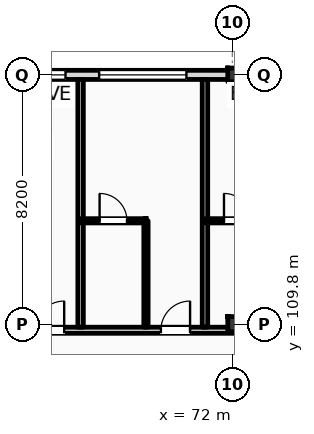
"""IFC4 building model, lengths in metres.
Left out: names, types, materials, properties, quantities, classifications, styles, units other than length and angle.
Written with IfcOpenShell. Run it as: python <this file> out.ifc"""

import sys

from ifc_helpers import new_model, si_unit, direction, frame, frame_2d, origin, origin_2d, place, context, subcontext, project, spatial, rectangle, i_section, extrude, element, fill, save


model = new_model("IFC4")
c1 = context("Model", 3, precision=1e-05, world=origin(), true_north=direction((0.0, 1.0)))
c2 = subcontext(c1, "Body", "Model", "MODEL_VIEW")
j1 = project(units=[si_unit("LENGTHUNIT", "METRE"), si_unit("PLANEANGLEUNIT", "RADIAN")], contexts=[c1])
p1 = place(None, origin())
s1 = spatial("IfcSite", under=j1, at=p1, CompositionType="ELEMENT")
p2 = place(p1, origin())
s2 = spatial("IfcBuilding", under=s1, at=p2, CompositionType="ELEMENT")
p3 = place(p2, frame((0.0, 0.0, 28.2)))
s3 = spatial("IfcBuildingStorey", under=s2, at=p3, CompositionType="ELEMENT", Elevation=28.2)
p4 = place(p3, frame((72.0, 109.8, 0.0), z_axis=(0.0, 0.0, 1.0), x_axis=(1.0, 0.0, 0.0)))
e1 = element("IfcColumn", 1, at=p4, inside=s3, PredefinedType="COLUMN", context=c2, shape_type="SweptSolid", body=[
    extrude(i_section(OverallWidth=0.3, OverallDepth=0.5, WebThickness=0.014, FlangeThickness=0.028, FilletRadius=0.027, at=origin_2d()), origin(), (0.0, 0.0, 1.0), 3.6),
])
p5 = place(p3, frame((72.0, 118.0, 0.0), z_axis=(0.0, 0.0, 1.0), x_axis=(1.0, 0.0, 0.0)))
e2 = element("IfcColumn", 2, at=p5, inside=s3, PredefinedType="COLUMN", context=c2, shape_type="SweptSolid", body=[
    extrude(i_section(OverallWidth=0.3, OverallDepth=0.45, WebThickness=0.014, FlangeThickness=0.026, FilletRadius=0.027, at=origin_2d()), origin(), (0.0, 0.0, 1.0), 3.6),
])
p6 = place(p3, frame((22.5, 118.0, 0.0), z_axis=(0.0, 0.0, 1.0), x_axis=(1.0, 0.0, 0.0)))
e3 = element("IfcWall", 3, at=p6, inside=s3, PredefinedType="STANDARD", context=c2, shape_type="SweptSolid", body=[
    extrude(rectangle(XDim=97.5, YDim=0.3, at=frame_2d((48.75, 0.0))), origin(), (0.0, 0.0, 1.0), 2.8),
])
p7 = place(p6, frame((0.91, 0.0, 0.9)))
e4 = element("IfcOpeningElement", 4, at=p7, cuts=e3, PredefinedType="OPENING", context=c2, shape_type="SweptSolid", body=[
    extrude(rectangle(XDim=0.9, YDim=1.72, at=frame_2d((0.45, 0.86))), frame((0.0, 0.16, 0.0), z_axis=(0.0, -1.0, 0.0), x_axis=(1.0, 0.0, 0.0)), (0.0, 0.0, 1.0), 0.32),
])
p8 = place(p6, frame((6.561, 0.0, 0.0)))
e5 = element("IfcOpeningElement", 5, at=p8, cuts=e3, PredefinedType="OPENING", context=c2, shape_type="SweptSolid", body=[
    extrude(rectangle(XDim=1.2, YDim=2.25, at=frame_2d((0.6, 1.125))), frame((0.0, 0.16, 0.0), z_axis=(0.0, -1.0, 0.0), x_axis=(1.0, 0.0, 0.0)), (0.0, 0.0, 1.0), 0.32),
])
p9 = place(p6, frame((11.477, 0.0, 0.9)))
e6 = element("IfcOpeningElement", 6, at=p9, cuts=e3, PredefinedType="OPENING", context=c2, shape_type="SweptSolid", body=[
    extrude(rectangle(XDim=1.1, YDim=1.5, at=frame_2d((0.55, 0.75))), frame((0.0, 0.16, 0.0), z_axis=(0.0, -1.0, 0.0), x_axis=(1.0, 0.0, 0.0)), (0.0, 0.0, 1.0), 0.32),
])
p10 = place(p6, frame((15.194, 0.0, 0.9)))
e7 = element("IfcOpeningElement", 7, at=p10, cuts=e3, PredefinedType="OPENING", context=c2, shape_type="SweptSolid", body=[
    extrude(rectangle(XDim=1.25, YDim=1.6, at=frame_2d((0.625, 0.8))), frame((0.0, 0.16, 0.0), z_axis=(0.0, -1.0, 0.0), x_axis=(1.0, 0.0, 0.0)), (0.0, 0.0, 1.0), 0.32),
])
p11 = place(p6, frame((19.509, 0.0, 0.9)))
e8 = element("IfcOpeningElement", 8, at=p11, cuts=e3, PredefinedType="OPENING", context=c2, shape_type="SweptSolid", body=[
    extrude(rectangle(XDim=1.4, YDim=1.7, at=frame_2d((0.7, 0.85))), frame((0.0, 0.16, 0.0), z_axis=(0.0, -1.0, 0.0), x_axis=(1.0, 0.0, 0.0)), (0.0, 0.0, 1.0), 0.32),
])
p12 = place(p6, frame((23.258, 0.0, 0.0)))
e9 = element("IfcOpeningElement", 9, at=p12, cuts=e3, PredefinedType="OPENING", context=c2, shape_type="SweptSolid", body=[
    extrude(rectangle(XDim=1.2, YDim=2.25, at=frame_2d((0.6, 1.125))), frame((0.0, 0.16, 0.0), z_axis=(0.0, -1.0, 0.0), x_axis=(1.0, 0.0, 0.0)), (0.0, 0.0, 1.0), 0.32),
])
p13 = place(p6, frame((28.115, 0.0, 0.9)))
e10 = element("IfcOpeningElement", 10, at=p13, cuts=e3, PredefinedType="OPENING", context=c2, shape_type="SweptSolid", body=[
    extrude(rectangle(XDim=1.75, YDim=1.72, at=frame_2d((0.875, 0.86))), frame((0.0, 0.16, 0.0), z_axis=(0.0, -1.0, 0.0), x_axis=(1.0, 0.0, 0.0)), (0.0, 0.0, 1.0), 0.32),
])
p14 = place(p6, frame((31.582, 0.0, 0.9)))
e11 = element("IfcOpeningElement", 11, at=p14, cuts=e3, PredefinedType="OPENING", context=c2, shape_type="SweptSolid", body=[
    extrude(rectangle(XDim=1.35, YDim=1.72, at=frame_2d((0.675, 0.86))), frame((0.0, 0.16, 0.0), z_axis=(0.0, -1.0, 0.0), x_axis=(1.0, 0.0, 0.0)), (0.0, 0.0, 1.0), 0.32),
])
p15 = place(p6, frame((37.379, 0.0, 0.0)))
e12 = element("IfcOpeningElement", 12, at=p15, cuts=e3, PredefinedType="OPENING", context=c2, shape_type="SweptSolid", body=[
    extrude(rectangle(XDim=1.2, YDim=2.25, at=frame_2d((0.6, 1.125))), frame((0.0, 0.16, 0.0), z_axis=(0.0, -1.0, 0.0), x_axis=(1.0, 0.0, 0.0)), (0.0, 0.0, 1.0), 0.32),
])
p16 = place(p6, frame((42.663, 0.0, 0.9)))
e13 = element("IfcOpeningElement", 13, at=p16, cuts=e3, PredefinedType="OPENING", context=c2, shape_type="SweptSolid", body=[
    extrude(rectangle(XDim=1.35, YDim=1.72, at=frame_2d((0.675, 0.86))), frame((0.0, 0.16, 0.0), z_axis=(0.0, -1.0, 0.0), x_axis=(1.0, 0.0, 0.0)), (0.0, 0.0, 1.0), 0.32),
])
p17 = place(p6, frame((45.119, 0.0, 0.9)))
e14 = element("IfcOpeningElement", 14, at=p17, cuts=e3, PredefinedType="OPENING", context=c2, shape_type="SweptSolid", body=[
    extrude(rectangle(XDim=2.871, YDim=1.72, at=frame_2d((1.436, 0.86))), frame((0.0, 0.16, 0.0), z_axis=(0.0, -1.0, 0.0), x_axis=(1.0, 0.0, 0.0)), (0.0, 0.0, 1.0), 0.32),
])
p18 = place(p6, frame((50.41, 0.0, 0.9)))
e15 = element("IfcOpeningElement", 15, at=p18, cuts=e3, PredefinedType="OPENING", context=c2, shape_type="SweptSolid", body=[
    extrude(rectangle(XDim=1.8, YDim=1.72, at=frame_2d((0.9, 0.86))), frame((0.0, 0.16, 0.0), z_axis=(0.0, -1.0, 0.0), x_axis=(1.0, 0.0, 0.0)), (0.0, 0.0, 1.0), 0.32),
])
p19 = place(p6, frame((54.375, 0.0, 0.0)))
e16 = element("IfcOpeningElement", 16, at=p19, cuts=e3, PredefinedType="OPENING", context=c2, shape_type="SweptSolid", body=[
    extrude(rectangle(XDim=1.2, YDim=2.25, at=frame_2d((0.6, 1.125))), frame((0.0, 0.16, 0.0), z_axis=(0.0, -1.0, 0.0), x_axis=(1.0, 0.0, 0.0)), (0.0, 0.0, 1.0), 0.32),
])
p20 = place(p6, frame((59.052, 0.0, 0.9)))
e17 = element("IfcOpeningElement", 17, at=p20, cuts=e3, PredefinedType="OPENING", context=c2, shape_type="SweptSolid", body=[
    extrude(rectangle(XDim=1.35, YDim=1.72, at=frame_2d((0.675, 0.86))), frame((0.0, 0.16, 0.0), z_axis=(0.0, -1.0, 0.0), x_axis=(1.0, 0.0, 0.0)), (0.0, 0.0, 1.0), 0.32),
])
p21 = place(p6, frame((62.768, 0.0, 0.9)))
e18 = element("IfcOpeningElement", 18, at=p21, cuts=e3, PredefinedType="OPENING", context=c2, shape_type="SweptSolid", body=[
    extrude(rectangle(XDim=1.5, YDim=1.72, at=frame_2d((0.75, 0.86))), frame((0.0, 0.16, 0.0), z_axis=(0.0, -1.0, 0.0), x_axis=(1.0, 0.0, 0.0)), (0.0, 0.0, 1.0), 0.32),
])
p22 = place(p6, frame((68.498, 0.0, 0.0)))
e19 = element("IfcOpeningElement", 19, at=p22, cuts=e3, PredefinedType="OPENING", context=c2, shape_type="SweptSolid", body=[
    extrude(rectangle(XDim=1.2, YDim=2.25, at=frame_2d((0.6, 1.125))), frame((0.0, 0.16, 0.0), z_axis=(0.0, -1.0, 0.0), x_axis=(1.0, 0.0, 0.0)), (0.0, 0.0, 1.0), 0.32),
])
p23 = place(p6, frame((71.265, 0.0, 0.9)))
e20 = element("IfcOpeningElement", 20, at=p23, cuts=e3, PredefinedType="OPENING", context=c2, shape_type="SweptSolid", body=[
    extrude(rectangle(XDim=0.9, YDim=1.72, at=frame_2d((0.45, 0.86))), frame((0.0, 0.16, 0.0), z_axis=(0.0, -1.0, 0.0), x_axis=(1.0, 0.0, 0.0)), (0.0, 0.0, 1.0), 0.32),
])
p24 = place(p6, frame((76.316, 0.0, 0.9)))
e21 = element("IfcOpeningElement", 21, at=p24, cuts=e3, PredefinedType="OPENING", context=c2, shape_type="SweptSolid", body=[
    extrude(rectangle(XDim=1.95, YDim=1.72, at=frame_2d((0.975, 0.86))), frame((0.0, 0.16, 0.0), z_axis=(0.0, -1.0, 0.0), x_axis=(1.0, 0.0, 0.0)), (0.0, 0.0, 1.0), 0.32),
])
p25 = place(p6, frame((81.632, 0.0, 0.9)))
e22 = element("IfcOpeningElement", 22, at=p25, cuts=e3, PredefinedType="OPENING", context=c2, shape_type="SweptSolid", body=[
    extrude(rectangle(XDim=1.35, YDim=1.72, at=frame_2d((0.675, 0.86))), frame((0.0, 0.16, 0.0), z_axis=(0.0, -1.0, 0.0), x_axis=(1.0, 0.0, 0.0)), (0.0, 0.0, 1.0), 0.32),
])
p26 = place(p6, frame((84.948, 0.0, 0.9)))
e23 = element("IfcOpeningElement", 23, at=p26, cuts=e3, PredefinedType="OPENING", context=c2, shape_type="SweptSolid", body=[
    extrude(rectangle(XDim=2.25, YDim=1.72, at=frame_2d((1.125, 0.86))), frame((0.0, 0.16, 0.0), z_axis=(0.0, -1.0, 0.0), x_axis=(1.0, 0.0, 0.0)), (0.0, 0.0, 1.0), 0.32),
])
p27 = place(p6, frame((90.063, 0.0, 0.9)))
e24 = element("IfcOpeningElement", 24, at=p27, cuts=e3, PredefinedType="OPENING", context=c2, shape_type="SweptSolid", body=[
    extrude(rectangle(XDim=1.8, YDim=1.72, at=frame_2d((0.9, 0.86))), frame((0.0, 0.16, 0.0), z_axis=(0.0, -1.0, 0.0), x_axis=(1.0, 0.0, 0.0)), (0.0, 0.0, 1.0), 0.32),
])
p28 = place(p6, frame((93.529, 0.0, 0.9)))
e25 = element("IfcOpeningElement", 25, at=p28, cuts=e3, PredefinedType="OPENING", context=c2, shape_type="SweptSolid", body=[
    extrude(rectangle(XDim=2.55, YDim=1.72, at=frame_2d((1.275, 0.86))), frame((0.0, 0.16, 0.0), z_axis=(0.0, -1.0, 0.0), x_axis=(1.0, 0.0, 0.0)), (0.0, 0.0, 1.0), 0.32),
])
p29 = place(p3, frame((10.65, 109.6, 0.0), z_axis=(0.0, 0.0, 1.0), x_axis=(1.0, 0.0, 0.0)))
e26 = element("IfcWall", 26, at=p29, inside=s3, PredefinedType="PARTITIONING", context=c2, shape_type="SweptSolid", body=[
    extrude(rectangle(XDim=109.21, YDim=0.2, at=frame_2d((54.605, 0.0))), origin(), (0.0, 0.0, 1.0), 2.8),
])
p30 = place(p29, frame((12.611, 0.0, 0.0)))
e27 = element("IfcOpeningElement", 27, at=p30, cuts=e26, PredefinedType="OPENING", context=c2, shape_type="SweptSolid", body=[
    extrude(rectangle(XDim=1.02, YDim=2.2, at=frame_2d((0.51, 1.1))), frame((0.0, 0.11, 0.0), z_axis=(0.0, -1.0, 0.0), x_axis=(1.0, 0.0, 0.0)), (0.0, 0.0, 1.0), 0.22),
])
p31 = place(p29, frame((19.451, 0.0, 0.0)))
e28 = element("IfcOpeningElement", 28, at=p31, cuts=e26, PredefinedType="OPENING", context=c2, shape_type="SweptSolid", body=[
    extrude(rectangle(XDim=1.02, YDim=2.2, at=frame_2d((0.51, 1.1))), frame((0.0, 0.11, 0.0), z_axis=(0.0, -1.0, 0.0), x_axis=(1.0, 0.0, 0.0)), (0.0, 0.0, 1.0), 0.22),
])
p32 = place(p29, frame((23.842, 0.0, 0.0)))
e29 = element("IfcOpeningElement", 29, at=p32, cuts=e26, PredefinedType="OPENING", context=c2, shape_type="SweptSolid", body=[
    extrude(rectangle(XDim=1.02, YDim=2.2, at=frame_2d((0.51, 1.1))), frame((0.0, 0.11, 0.0), z_axis=(0.0, -1.0, 0.0), x_axis=(1.0, 0.0, 0.0)), (0.0, 0.0, 1.0), 0.22),
])
p33 = place(p29, frame((26.084, 0.0, 0.0)))
e30 = element("IfcOpeningElement", 30, at=p33, cuts=e26, PredefinedType="OPENING", context=c2, shape_type="SweptSolid", body=[
    extrude(rectangle(XDim=1.02, YDim=2.2, at=frame_2d((0.51, 1.1))), frame((0.0, 0.11, 0.0), z_axis=(0.0, -1.0, 0.0), x_axis=(1.0, 0.0, 0.0)), (0.0, 0.0, 1.0), 0.22),
])
p34 = place(p29, frame((32.655, 0.0, 0.0)))
e31 = element("IfcOpeningElement", 31, at=p34, cuts=e26, PredefinedType="OPENING", context=c2, shape_type="SweptSolid", body=[
    extrude(rectangle(XDim=0.96, YDim=2.2, at=frame_2d((0.48, 1.1))), frame((0.0, 0.11, 0.0), z_axis=(0.0, -1.0, 0.0), x_axis=(1.0, 0.0, 0.0)), (0.0, 0.0, 1.0), 0.22),
])
p35 = place(p29, frame((34.895, 0.0, 0.0)))
e32 = element("IfcOpeningElement", 32, at=p35, cuts=e26, PredefinedType="OPENING", context=c2, shape_type="SweptSolid", body=[
    extrude(rectangle(XDim=0.96, YDim=2.2, at=frame_2d((0.48, 1.1))), frame((0.0, 0.11, 0.0), z_axis=(0.0, -1.0, 0.0), x_axis=(1.0, 0.0, 0.0)), (0.0, 0.0, 1.0), 0.22),
])
p36 = place(p29, frame((41.436, 0.0, 0.0)))
e33 = element("IfcOpeningElement", 33, at=p36, cuts=e26, PredefinedType="OPENING", context=c2, shape_type="SweptSolid", body=[
    extrude(rectangle(XDim=0.96, YDim=2.2, at=frame_2d((0.48, 1.1))), frame((0.0, 0.11, 0.0), z_axis=(0.0, -1.0, 0.0), x_axis=(1.0, 0.0, 0.0)), (0.0, 0.0, 1.0), 0.22),
])
p37 = place(p29, frame((43.427, 0.0, 0.0)))
e34 = element("IfcOpeningElement", 34, at=p37, cuts=e26, PredefinedType="OPENING", context=c2, shape_type="SweptSolid", body=[
    extrude(rectangle(XDim=0.96, YDim=2.2, at=frame_2d((0.48, 1.1))), frame((0.0, 0.11, 0.0), z_axis=(0.0, -1.0, 0.0), x_axis=(1.0, 0.0, 0.0)), (0.0, 0.0, 1.0), 0.22),
])
p38 = place(p29, frame((50.218, 0.0, 0.0)))
e35 = element("IfcOpeningElement", 35, at=p38, cuts=e26, PredefinedType="OPENING", context=c2, shape_type="SweptSolid", body=[
    extrude(rectangle(XDim=0.96, YDim=2.2, at=frame_2d((0.48, 1.1))), frame((0.0, 0.11, 0.0), z_axis=(0.0, -1.0, 0.0), x_axis=(1.0, 0.0, 0.0)), (0.0, 0.0, 1.0), 0.22),
])
p39 = place(p29, frame((54.859, 0.0, 0.0)))
e36 = element("IfcOpeningElement", 36, at=p39, cuts=e26, PredefinedType="OPENING", context=c2, shape_type="SweptSolid", body=[
    extrude(rectangle(XDim=0.96, YDim=2.2, at=frame_2d((0.48, 1.1))), frame((0.0, 0.11, 0.0), z_axis=(0.0, -1.0, 0.0), x_axis=(1.0, 0.0, 0.0)), (0.0, 0.0, 1.0), 0.22),
])
p40 = place(p29, frame((59.0, 0.0, 0.0)))
e37 = element("IfcOpeningElement", 37, at=p40, cuts=e26, PredefinedType="OPENING", context=c2, shape_type="SweptSolid", body=[
    extrude(rectangle(XDim=0.96, YDim=2.2, at=frame_2d((0.48, 1.1))), frame((0.0, 0.11, 0.0), z_axis=(0.0, -1.0, 0.0), x_axis=(1.0, 0.0, 0.0)), (0.0, 0.0, 1.0), 0.22),
])
p41 = place(p29, frame((63.39, 0.0, 0.0)))
e38 = element("IfcOpeningElement", 38, at=p41, cuts=e26, PredefinedType="OPENING", context=c2, shape_type="SweptSolid", body=[
    extrude(rectangle(XDim=0.96, YDim=2.2, at=frame_2d((0.48, 1.1))), frame((0.0, 0.11, 0.0), z_axis=(0.0, -1.0, 0.0), x_axis=(1.0, 0.0, 0.0)), (0.0, 0.0, 1.0), 0.22),
])
p42 = place(p29, frame((65.631, 0.0, 0.0)))
e39 = element("IfcOpeningElement", 39, at=p42, cuts=e26, PredefinedType="OPENING", context=c2, shape_type="SweptSolid", body=[
    extrude(rectangle(XDim=0.96, YDim=2.2, at=frame_2d((0.48, 1.1))), frame((0.0, 0.11, 0.0), z_axis=(0.0, -1.0, 0.0), x_axis=(1.0, 0.0, 0.0)), (0.0, 0.0, 1.0), 0.22),
])
p43 = place(p29, frame((72.172, 0.0, 0.0)))
e40 = element("IfcOpeningElement", 40, at=p43, cuts=e26, PredefinedType="OPENING", context=c2, shape_type="SweptSolid", body=[
    extrude(rectangle(XDim=0.96, YDim=2.2, at=frame_2d((0.48, 1.1))), frame((0.0, 0.11, 0.0), z_axis=(0.0, -1.0, 0.0), x_axis=(1.0, 0.0, 0.0)), (0.0, 0.0, 1.0), 0.22),
])
p44 = place(p29, frame((74.413, 0.0, 0.0)))
e41 = element("IfcOpeningElement", 41, at=p44, cuts=e26, PredefinedType="OPENING", context=c2, shape_type="SweptSolid", body=[
    extrude(rectangle(XDim=0.96, YDim=2.2, at=frame_2d((0.48, 1.1))), frame((0.0, 0.11, 0.0), z_axis=(0.0, -1.0, 0.0), x_axis=(1.0, 0.0, 0.0)), (0.0, 0.0, 1.0), 0.22),
])
p45 = place(p29, frame((80.954, 0.0, 0.0)))
e42 = element("IfcOpeningElement", 42, at=p45, cuts=e26, PredefinedType="OPENING", context=c2, shape_type="SweptSolid", body=[
    extrude(rectangle(XDim=0.96, YDim=2.2, at=frame_2d((0.48, 1.1))), frame((0.0, 0.11, 0.0), z_axis=(0.0, -1.0, 0.0), x_axis=(1.0, 0.0, 0.0)), (0.0, 0.0, 1.0), 0.22),
])
p46 = place(p29, frame((83.195, 0.0, 0.0)))
e43 = element("IfcOpeningElement", 43, at=p46, cuts=e26, PredefinedType="OPENING", context=c2, shape_type="SweptSolid", body=[
    extrude(rectangle(XDim=0.96, YDim=2.2, at=frame_2d((0.48, 1.1))), frame((0.0, 0.11, 0.0), z_axis=(0.0, -1.0, 0.0), x_axis=(1.0, 0.0, 0.0)), (0.0, 0.0, 1.0), 0.22),
])
p47 = place(p29, frame((89.735, 0.0, 0.0)))
e44 = element("IfcOpeningElement", 44, at=p47, cuts=e26, PredefinedType="OPENING", context=c2, shape_type="SweptSolid", body=[
    extrude(rectangle(XDim=0.96, YDim=2.2, at=frame_2d((0.48, 1.1))), frame((0.0, 0.11, 0.0), z_axis=(0.0, -1.0, 0.0), x_axis=(1.0, 0.0, 0.0)), (0.0, 0.0, 1.0), 0.22),
])
p48 = place(p29, frame((94.126, 0.0, 0.0)))
e45 = element("IfcOpeningElement", 45, at=p48, cuts=e26, PredefinedType="OPENING", context=c2, shape_type="SweptSolid", body=[
    extrude(rectangle(XDim=0.96, YDim=2.2, at=frame_2d((0.48, 1.1))), frame((0.0, 0.11, 0.0), z_axis=(0.0, -1.0, 0.0), x_axis=(1.0, 0.0, 0.0)), (0.0, 0.0, 1.0), 0.22),
])
p49 = place(p29, frame((98.517, 0.0, 0.0)))
e46 = element("IfcOpeningElement", 46, at=p49, cuts=e26, PredefinedType="OPENING", context=c2, shape_type="SweptSolid", body=[
    extrude(rectangle(XDim=0.96, YDim=2.2, at=frame_2d((0.48, 1.1))), frame((0.0, 0.11, 0.0), z_axis=(0.0, -1.0, 0.0), x_axis=(1.0, 0.0, 0.0)), (0.0, 0.0, 1.0), 0.22),
])
p50 = place(p29, frame((102.908, 0.0, 0.0)))
e47 = element("IfcOpeningElement", 47, at=p50, cuts=e26, PredefinedType="OPENING", context=c2, shape_type="SweptSolid", body=[
    extrude(rectangle(XDim=0.96, YDim=2.2, at=frame_2d((0.48, 1.1))), frame((0.0, 0.11, 0.0), z_axis=(0.0, -1.0, 0.0), x_axis=(1.0, 0.0, 0.0)), (0.0, 0.0, 1.0), 0.22),
])
p51 = place(p29, frame((105.099, 0.0, 0.0)))
e48 = element("IfcOpeningElement", 48, at=p51, cuts=e26, PredefinedType="OPENING", context=c2, shape_type="SweptSolid", body=[
    extrude(rectangle(XDim=0.96, YDim=2.2, at=frame_2d((0.48, 1.1))), frame((0.0, 0.11, 0.0), z_axis=(0.0, -1.0, 0.0), x_axis=(1.0, 0.0, 0.0)), (0.0, 0.0, 1.0), 0.22),
])
p52 = place(p29, frame((2.716, 0.0, 0.0)))
e49 = element("IfcOpeningElement", 49, at=p52, cuts=e26, PredefinedType="OPENING", context=c2, shape_type="SweptSolid", body=[
    extrude(rectangle(XDim=1.35, YDim=2.25, at=frame_2d((0.675, 1.125))), frame((0.0, 0.11, 0.0), z_axis=(0.0, -1.0, 0.0), x_axis=(1.0, 0.0, 0.0)), (0.0, 0.0, 1.0), 0.22),
])
p53 = place(p29, frame((6.65, 0.0, 0.0)))
e50 = element("IfcOpeningElement", 50, at=p53, cuts=e26, PredefinedType="OPENING", context=c2, shape_type="SweptSolid", body=[
    extrude(rectangle(XDim=1.35, YDim=2.25, at=frame_2d((0.675, 1.125))), frame((0.0, 0.11, 0.0), z_axis=(0.0, -1.0, 0.0), x_axis=(1.0, 0.0, 0.0)), (0.0, 0.0, 1.0), 0.22),
])
p54 = place(p29, frame((10.583, 0.0, 0.0)))
e51 = element("IfcOpeningElement", 51, at=p54, cuts=e26, PredefinedType="OPENING", context=c2, shape_type="SweptSolid", body=[
    extrude(rectangle(XDim=1.35, YDim=2.25, at=frame_2d((0.675, 1.125))), frame((0.0, 0.11, 0.0), z_axis=(0.0, -1.0, 0.0), x_axis=(1.0, 0.0, 0.0)), (0.0, 0.0, 1.0), 0.22),
])
p55 = place(p3, frame((67.009, 109.7, 0.0), z_axis=(0.0, 0.0, 1.0), x_axis=(0.0, 1.0, 0.0)))
e52 = element("IfcWall", 52, at=p55, inside=s3, PredefinedType="PARTITIONING", context=c2, shape_type="SweptSolid", body=[
    extrude(rectangle(XDim=8.15, YDim=0.18, at=frame_2d((4.075, 0.0))), origin(), (0.0, 0.0, 1.0), 3.05),
])
p56 = place(p3, frame((71.1, 109.7, 0.0), z_axis=(0.0, 0.0, 1.0), x_axis=(0.0, 1.0, 0.0)))
e53 = element("IfcWall", 53, at=p56, inside=s3, PredefinedType="PARTITIONING", context=c2, shape_type="SweptSolid", body=[
    extrude(rectangle(XDim=8.15, YDim=0.18, at=frame_2d((4.075, 0.0))), origin(), (0.0, 0.0, 1.0), 3.36),
])
p57 = place(p3, frame((69.159, 109.7, 0.0), z_axis=(0.0, 0.0, 1.0), x_axis=(0.0, 1.0, 0.0)))
e54 = element("IfcWall", 54, at=p57, inside=s3, PredefinedType="PARTITIONING", context=c2, shape_type="SweptSolid", body=[
    extrude(rectangle(XDim=3.5, YDim=0.14, at=frame_2d((1.75, 0.0))), origin(), (0.0, 0.0, 1.0), 3.36),
])
p58 = place(p3, frame((67.009, 113.2, 0.0), z_axis=(0.0, 0.0, 1.0), x_axis=(1.0, 0.0, 0.0)))
e55 = element("IfcWall", 55, at=p58, inside=s3, PredefinedType="PARTITIONING", context=c2, shape_type="SweptSolid", body=[
    extrude(rectangle(XDim=2.15, YDim=0.14, at=frame_2d((1.075, 0.0))), origin(), (0.0, 0.0, 1.0), 3.36),
])
p59 = place(p58, frame((0.625, 0.0, 0.0)))
e56 = element("IfcOpeningElement", 56, at=p59, cuts=e55, PredefinedType="OPENING", context=c2, shape_type="SweptSolid", body=[
    extrude(rectangle(XDim=0.9, YDim=2.1, at=frame_2d((0.45, 1.05))), frame((0.0, 0.08, 0.0), z_axis=(0.0, -1.0, 0.0), x_axis=(1.0, 0.0, 0.0)), (0.0, 0.0, 1.0), 0.16),
])
p60 = place(p3, frame((71.1, 113.2, 0.0), z_axis=(0.0, 0.0, 1.0), x_axis=(1.0, 0.0, 0.0)))
e57 = element("IfcWall", 57, at=p60, inside=s3, PredefinedType="PARTITIONING", context=c2, shape_type="SweptSolid", body=[
    extrude(rectangle(XDim=2.15, YDim=0.14, at=frame_2d((1.075, 0.0))), origin(), (0.0, 0.0, 1.0), 3.36),
])
p61 = place(p60, frame((0.625, 0.0, 0.0)))
e58 = element("IfcOpeningElement", 58, at=p61, cuts=e57, PredefinedType="OPENING", context=c2, shape_type="SweptSolid", body=[
    extrude(rectangle(XDim=0.9, YDim=2.1, at=frame_2d((0.45, 1.05))), frame((0.0, 0.08, 0.0), z_axis=(0.0, -1.0, 0.0), x_axis=(1.0, 0.0, 0.0)), (0.0, 0.0, 1.0), 0.16),
])
p62 = place(p16, origin())
e59 = element("IfcWindow", 59, at=p62, inside=s3, PartitioningType="DOUBLE_PANEL_VERTICAL", PredefinedType="WINDOW", context=c2, shape_type="SweptSolid", body=[
    extrude(rectangle(XDim=1.35, YDim=1.72, at=frame_2d((0.675, 0.86))), frame((0.0, 0.03, 0.0), z_axis=(0.0, -1.0, 0.0), x_axis=(1.0, 0.0, 0.0)), (0.0, 0.0, 1.0), 0.06),
])
fill(e13, e59)
p63 = place(p17, origin())
e60 = element("IfcWindow", 60, at=p63, inside=s3, PartitioningType="DOUBLE_PANEL_VERTICAL", PredefinedType="WINDOW", context=c2, shape_type="SweptSolid", body=[
    extrude(rectangle(XDim=2.871, YDim=1.72, at=frame_2d((1.436, 0.86))), frame((0.0, 0.03, 0.0), z_axis=(0.0, -1.0, 0.0), x_axis=(1.0, 0.0, 0.0)), (0.0, 0.0, 1.0), 0.06),
])
fill(e14, e60)
p64 = place(p39, origin())
e61 = element("IfcDoor", 61, at=p64, inside=s3, OperationType="SINGLE_SWING_RIGHT", PredefinedType="DOOR", context=c2, shape_type="SweptSolid", body=[
    extrude(rectangle(XDim=0.96, YDim=2.2, at=frame_2d((0.48, 1.1))), frame((0.0, 0.025, 0.0), z_axis=(0.0, -1.0, 0.0), x_axis=(1.0, 0.0, 0.0)), (0.0, 0.0, 1.0), 0.05),
])
fill(e36, e61)
p65 = place(p40, origin())
e62 = element("IfcDoor", 62, at=p65, inside=s3, OperationType="SINGLE_SWING_RIGHT", PredefinedType="DOOR", context=c2, shape_type="SweptSolid", body=[
    extrude(rectangle(XDim=0.96, YDim=2.2, at=frame_2d((0.48, 1.1))), frame((0.0, 0.025, 0.0), z_axis=(0.0, -1.0, 0.0), x_axis=(1.0, 0.0, 0.0)), (0.0, 0.0, 1.0), 0.05),
])
fill(e37, e62)
p66 = place(p59, origin())
e63 = element("IfcDoor", 63, at=p66, inside=s3, OperationType="SINGLE_SWING_LEFT", PredefinedType="DOOR", context=c2, shape_type="SweptSolid", body=[
    extrude(rectangle(XDim=0.9, YDim=2.1, at=frame_2d((0.45, 1.05))), frame((0.0, 0.025, 0.0), z_axis=(0.0, -1.0, 0.0), x_axis=(1.0, 0.0, 0.0)), (0.0, 0.0, 1.0), 0.05),
])
fill(e56, e63)
p67 = place(p61, origin())
e64 = element("IfcDoor", 64, at=p67, inside=s3, OperationType="SINGLE_SWING_LEFT", PredefinedType="DOOR", context=c2, shape_type="SweptSolid", body=[
    extrude(rectangle(XDim=0.9, YDim=2.1, at=frame_2d((0.45, 1.05))), frame((0.0, 0.025, 0.0), z_axis=(0.0, -1.0, 0.0), x_axis=(1.0, 0.0, 0.0)), (0.0, 0.0, 1.0), 0.05),
])
fill(e58, e64)
save(model, sys.argv[1])
